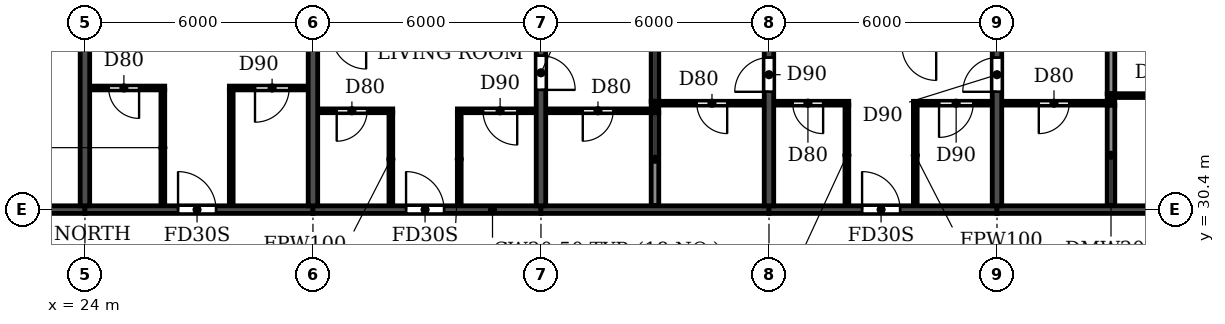
"""IFC4 building model, lengths in metres.
Left out: names, types, materials, properties, quantities, classifications, styles, units other than length and angle.
Written with IfcOpenShell. Run it as: python <this file> out.ifc"""

import sys

from ifc_helpers import new_model, si_unit, direction, frame, frame_2d, origin, place, context, subcontext, project, spatial, rectangle, extrude, element, fill, save


model = new_model("IFC4")
c1 = context("Model", 3, precision=1e-05, world=origin(), true_north=direction((0.0, 1.0)))
c2 = subcontext(c1, "Body", "Model", "MODEL_VIEW")
j1 = project(units=[si_unit("LENGTHUNIT", "METRE"), si_unit("PLANEANGLEUNIT", "RADIAN")], contexts=[c1])
p1 = place(None, origin())
s1 = spatial("IfcSite", under=j1, at=p1, CompositionType="ELEMENT")
p2 = place(p1, origin())
s2 = spatial("IfcBuilding", under=s1, at=p2, CompositionType="ELEMENT")
p3 = place(p2, frame((0.0, 0.0, 181.8)))
s3 = spatial("IfcBuildingStorey", under=s2, at=p3, CompositionType="ELEMENT", Elevation=181.8)
for number, where, z_axis, x_axis in (
    (1, (24.0, 30.5, 0.0), (0.0, 0.0, 1.0), (0.0, 1.0, 0.0)),
    (2, (30.0, 30.5, 0.0), (0.0, 0.0, 1.0), (0.0, 1.0, 0.0)),
):
    element("IfcWall", number, at=place(p3, frame(where, z_axis=z_axis, x_axis=x_axis)), inside=s3, PredefinedType="SHEAR", context=c2, shape_type="SweptSolid", body=[
        extrude(rectangle(XDim=10.5, YDim=0.25, at=frame_2d((5.25, 0.0))), origin(), (0.0, 0.0, 1.0), 3.08),
    ])
p4 = place(p3, frame((36.0, 30.5, 0.0), z_axis=(0.0, 0.0, 1.0), x_axis=(0.0, 1.0, 0.0)))
e3 = element("IfcWall", 3, at=p4, inside=s3, PredefinedType="SHEAR", context=c2, shape_type="SweptSolid", body=[
    extrude(rectangle(XDim=10.5, YDim=0.25, at=frame_2d((5.25, 0.0))), origin(), (0.0, 0.0, 1.0), 3.08),
])
p5 = place(p4, frame((3.05, 0.0, 0.0)))
e4 = element("IfcOpeningElement", 4, at=p5, cuts=e3, PredefinedType="OPENING", context=c2, shape_type="SweptSolid", body=[
    extrude(rectangle(XDim=0.9, YDim=2.1, at=frame_2d((0.45, 1.05))), frame((0.0, 0.135, 0.0), z_axis=(0.0, -1.0, 0.0), x_axis=(1.0, 0.0, 0.0)), (0.0, 0.0, 1.0), 0.27),
])
p6 = place(p3, frame((42.0, 30.5, 0.0), z_axis=(0.0, 0.0, 1.0), x_axis=(0.0, 1.0, 0.0)))
e5 = element("IfcWall", 5, at=p6, inside=s3, PredefinedType="SHEAR", context=c2, shape_type="SweptSolid", body=[
    extrude(rectangle(XDim=10.5, YDim=0.25, at=frame_2d((5.25, 0.0))), origin(), (0.0, 0.0, 1.0), 3.08),
])
p7 = place(p6, frame((3.0, 0.0, 0.0)))
e6 = element("IfcOpeningElement", 6, at=p7, cuts=e5, PredefinedType="OPENING", context=c2, shape_type="SweptSolid", body=[
    extrude(rectangle(XDim=0.9, YDim=2.1, at=frame_2d((0.45, 1.05))), frame((0.0, 0.135, 0.0), z_axis=(0.0, -1.0, 0.0), x_axis=(1.0, 0.0, 0.0)), (0.0, 0.0, 1.0), 0.27),
])
p8 = place(p3, frame((48.0, 30.5, 0.0), z_axis=(0.0, 0.0, 1.0), x_axis=(0.0, 1.0, 0.0)))
e7 = element("IfcWall", 7, at=p8, inside=s3, PredefinedType="SHEAR", context=c2, shape_type="SweptSolid", body=[
    extrude(rectangle(XDim=10.5, YDim=0.25, at=frame_2d((5.25, 0.0))), origin(), (0.0, 0.0, 1.0), 3.08),
])
p9 = place(p8, frame((3.0, 0.0, 0.0)))
e8 = element("IfcOpeningElement", 8, at=p9, cuts=e7, PredefinedType="OPENING", context=c2, shape_type="SweptSolid", body=[
    extrude(rectangle(XDim=0.9, YDim=2.1, at=frame_2d((0.45, 1.05))), frame((0.0, 0.135, 0.0), z_axis=(0.0, -1.0, 0.0), x_axis=(1.0, 0.0, 0.0)), (0.0, 0.0, 1.0), 0.27),
])
p10 = place(p3, frame((18.2, 30.4, 0.0), z_axis=(0.0, 0.0, 1.0), x_axis=(1.0, 0.0, 0.0)))
e9 = element("IfcWall", 9, at=p10, inside=s3, PredefinedType="SHEAR", context=c2, shape_type="SweptSolid", body=[
    extrude(rectangle(XDim=5.8, YDim=0.2, at=frame_2d((2.9, 0.0))), origin(), (0.0, 0.0, 1.0), 2.48),
])
p11 = place(p10, frame((2.3, 0.0, 0.0)))
e10 = element("IfcOpeningElement", 10, at=p11, cuts=e9, PredefinedType="OPENING", context=c2, shape_type="SweptSolid", body=[
    extrude(rectangle(XDim=1.0, YDim=2.1, at=frame_2d((0.5, 1.05))), frame((0.0, 0.11, 0.0), z_axis=(0.0, -1.0, 0.0), x_axis=(1.0, 0.0, 0.0)), (0.0, 0.0, 1.0), 0.22),
])
p12 = place(p3, frame((24.0, 30.4, 0.0), z_axis=(0.0, 0.0, 1.0), x_axis=(1.0, 0.0, 0.0)))
e11 = element("IfcWall", 11, at=p12, inside=s3, PredefinedType="SHEAR", context=c2, shape_type="SweptSolid", body=[
    extrude(rectangle(XDim=6.0, YDim=0.2, at=frame_2d((3.0, 0.0))), origin(), (0.0, 0.0, 1.0), 2.48),
])
p13 = place(p12, frame((2.45, 0.0, 0.0)))
e12 = element("IfcOpeningElement", 12, at=p13, cuts=e11, PredefinedType="OPENING", context=c2, shape_type="SweptSolid", body=[
    extrude(rectangle(XDim=1.0, YDim=2.1, at=frame_2d((0.5, 1.05))), frame((0.0, 0.11, 0.0), z_axis=(0.0, -1.0, 0.0), x_axis=(1.0, 0.0, 0.0)), (0.0, 0.0, 1.0), 0.22),
])
p14 = place(p3, frame((30.0, 30.4, 0.0), z_axis=(0.0, 0.0, 1.0), x_axis=(1.0, 0.0, 0.0)))
e13 = element("IfcWall", 13, at=p14, inside=s3, PredefinedType="SHEAR", context=c2, shape_type="SweptSolid", body=[
    extrude(rectangle(XDim=6.0, YDim=0.2, at=frame_2d((3.0, 0.0))), origin(), (0.0, 0.0, 1.0), 2.48),
])
p15 = place(p14, frame((2.45, 0.0, 0.0)))
e14 = element("IfcOpeningElement", 14, at=p15, cuts=e13, PredefinedType="OPENING", context=c2, shape_type="SweptSolid", body=[
    extrude(rectangle(XDim=1.0, YDim=2.1, at=frame_2d((0.5, 1.05))), frame((0.0, 0.11, 0.0), z_axis=(0.0, -1.0, 0.0), x_axis=(1.0, 0.0, 0.0)), (0.0, 0.0, 1.0), 0.22),
])
p16 = place(p3, frame((36.0, 30.4, 0.0), z_axis=(0.0, 0.0, 1.0), x_axis=(1.0, 0.0, 0.0)))
e15 = element("IfcWall", 15, at=p16, inside=s3, PredefinedType="SHEAR", context=c2, shape_type="SweptSolid", body=[
    extrude(rectangle(XDim=6.0, YDim=0.2, at=frame_2d((3.0, 0.0))), origin(), (0.0, 0.0, 1.0), 2.48),
])
p17 = place(p3, frame((42.0, 30.4, 0.0), z_axis=(0.0, 0.0, 1.0), x_axis=(1.0, 0.0, 0.0)))
e16 = element("IfcWall", 16, at=p17, inside=s3, PredefinedType="SHEAR", context=c2, shape_type="SweptSolid", body=[
    extrude(rectangle(XDim=6.0, YDim=0.2, at=frame_2d((3.0, 0.0))), origin(), (0.0, 0.0, 1.0), 2.48),
])
p18 = place(p17, frame((2.45, 0.0, 0.0)))
e17 = element("IfcOpeningElement", 17, at=p18, cuts=e16, PredefinedType="OPENING", context=c2, shape_type="SweptSolid", body=[
    extrude(rectangle(XDim=1.0, YDim=2.1, at=frame_2d((0.5, 1.05))), frame((0.0, 0.11, 0.0), z_axis=(0.0, -1.0, 0.0), x_axis=(1.0, 0.0, 0.0)), (0.0, 0.0, 1.0), 0.22),
])
p19 = place(p3, frame((48.0, 30.4, 0.0), z_axis=(0.0, 0.0, 1.0), x_axis=(1.0, 0.0, 0.0)))
e18 = element("IfcWall", 18, at=p19, inside=s3, PredefinedType="SHEAR", context=c2, shape_type="SweptSolid", body=[
    extrude(rectangle(XDim=6.0, YDim=0.2, at=frame_2d((3.0, 0.0))), origin(), (0.0, 0.0, 1.0), 2.48),
])
p20 = place(p3, frame((39.0, 30.51, 0.0), z_axis=(0.0, 0.0, 1.0), x_axis=(0.0, 1.0, 0.0)))
e19 = element("IfcWall", 19, at=p20, inside=s3, PredefinedType="PARTITIONING", context=c2, shape_type="SweptSolid", body=[
    extrude(rectangle(XDim=2.44, YDim=0.2, at=frame_2d((1.22, 0.0))), origin(), (0.0, 0.0, 1.0), 3.08),
])
p21 = place(p3, frame((39.0, 33.25, 0.0), z_axis=(0.0, 0.0, 1.0), x_axis=(0.0, 1.0, 0.0)))
e20 = element("IfcWall", 20, at=p21, inside=s3, PredefinedType="PARTITIONING", context=c2, shape_type="SweptSolid", body=[
    extrude(rectangle(XDim=7.89, YDim=0.2, at=frame_2d((3.945, 0.0))), origin(), (0.0, 0.0, 1.0), 3.08),
])
p22 = place(p3, frame((51.0, 30.51, 0.0), z_axis=(0.0, 0.0, 1.0), x_axis=(0.0, 1.0, 0.0)))
e21 = element("IfcWall", 21, at=p22, inside=s3, PredefinedType="PARTITIONING", context=c2, shape_type="SweptSolid", body=[
    extrude(rectangle(XDim=2.64, YDim=0.2, at=frame_2d((1.32, 0.0))), origin(), (0.0, 0.0, 1.0), 3.08),
])
p23 = place(p3, frame((51.0, 33.45, 0.0), z_axis=(0.0, 0.0, 1.0), x_axis=(0.0, 1.0, 0.0)))
e22 = element("IfcWall", 22, at=p23, inside=s3, PredefinedType="PARTITIONING", context=c2, shape_type="SweptSolid", body=[
    extrude(rectangle(XDim=7.69, YDim=0.2, at=frame_2d((3.845, 0.0))), origin(), (0.0, 0.0, 1.0), 3.08),
])
p24 = place(p3, frame((30.135, 33.0, 0.0), z_axis=(0.0, 0.0, 1.0), x_axis=(1.0, 0.0, 0.0)))
e23 = element("IfcWall", 23, at=p24, inside=s3, PredefinedType="PARTITIONING", context=c2, shape_type="SweptSolid", body=[
    extrude(rectangle(XDim=1.965, YDim=0.1, at=frame_2d((0.982, 0.0))), origin(), (0.0, 0.0, 1.0), 3.08),
])
p25 = place(p24, frame((0.49, 0.0, 0.0)))
e24 = element("IfcOpeningElement", 24, at=p25, cuts=e23, PredefinedType="OPENING", context=c2, shape_type="SweptSolid", body=[
    extrude(rectangle(XDim=0.8, YDim=2.1, at=frame_2d((0.4, 1.05))), frame((0.0, 0.06, 0.0), z_axis=(0.0, -1.0, 0.0), x_axis=(1.0, 0.0, 0.0)), (0.0, 0.0, 1.0), 0.12),
])
p26 = place(p3, frame((33.8, 33.0, 0.0), z_axis=(0.0, 0.0, 1.0), x_axis=(1.0, 0.0, 0.0)))
e25 = element("IfcWall", 25, at=p26, inside=s3, PredefinedType="PARTITIONING", context=c2, shape_type="SweptSolid", body=[
    extrude(rectangle(XDim=2.065, YDim=0.1, at=frame_2d((1.032, 0.0))), origin(), (0.0, 0.0, 1.0), 3.08),
])
p27 = place(p26, frame((0.675, 0.0, 0.0)))
e26 = element("IfcOpeningElement", 26, at=p27, cuts=e25, PredefinedType="OPENING", context=c2, shape_type="SweptSolid", body=[
    extrude(rectangle(XDim=0.9, YDim=2.1, at=frame_2d((0.45, 1.05))), frame((0.0, 0.06, 0.0), z_axis=(0.0, -1.0, 0.0), x_axis=(1.0, 0.0, 0.0)), (0.0, 0.0, 1.0), 0.12),
])
p28 = place(p3, frame((36.135, 33.0, 0.0), z_axis=(0.0, 0.0, 1.0), x_axis=(1.0, 0.0, 0.0)))
e27 = element("IfcWall", 27, at=p28, inside=s3, PredefinedType="PARTITIONING", context=c2, shape_type="SweptSolid", body=[
    extrude(rectangle(XDim=2.965, YDim=0.1, at=frame_2d((1.482, 0.0))), origin(), (0.0, 0.0, 1.0), 3.08),
])
p29 = place(p28, frame((0.965, 0.0, 0.0)))
e28 = element("IfcOpeningElement", 28, at=p29, cuts=e27, PredefinedType="OPENING", context=c2, shape_type="SweptSolid", body=[
    extrude(rectangle(XDim=0.8, YDim=2.1, at=frame_2d((0.4, 1.05))), frame((0.0, 0.06, 0.0), z_axis=(0.0, -1.0, 0.0), x_axis=(1.0, 0.0, 0.0)), (0.0, 0.0, 1.0), 0.12),
])
p30 = place(p3, frame((38.9, 33.2, 0.0), z_axis=(0.0, 0.0, 1.0), x_axis=(1.0, 0.0, 0.0)))
e29 = element("IfcWall", 29, at=p30, inside=s3, PredefinedType="PARTITIONING", context=c2, shape_type="SweptSolid", body=[
    extrude(rectangle(XDim=2.965, YDim=0.1, at=frame_2d((1.482, 0.0))), origin(), (0.0, 0.0, 1.0), 3.08),
])
p31 = place(p30, frame((1.2, 0.0, 0.0)))
e30 = element("IfcOpeningElement", 30, at=p31, cuts=e29, PredefinedType="OPENING", context=c2, shape_type="SweptSolid", body=[
    extrude(rectangle(XDim=0.8, YDim=2.1, at=frame_2d((0.4, 1.05))), frame((0.0, 0.06, 0.0), z_axis=(0.0, -1.0, 0.0), x_axis=(1.0, 0.0, 0.0)), (0.0, 0.0, 1.0), 0.12),
])
p32 = place(p3, frame((42.135, 33.2, 0.0), z_axis=(0.0, 0.0, 1.0), x_axis=(1.0, 0.0, 0.0)))
e31 = element("IfcWall", 31, at=p32, inside=s3, PredefinedType="PARTITIONING", context=c2, shape_type="SweptSolid", body=[
    extrude(rectangle(XDim=1.965, YDim=0.1, at=frame_2d((0.982, 0.0))), origin(), (0.0, 0.0, 1.0), 3.08),
])
p33 = place(p32, frame((0.49, 0.0, 0.0)))
e32 = element("IfcOpeningElement", 32, at=p33, cuts=e31, PredefinedType="OPENING", context=c2, shape_type="SweptSolid", body=[
    extrude(rectangle(XDim=0.8, YDim=2.1, at=frame_2d((0.4, 1.05))), frame((0.0, 0.06, 0.0), z_axis=(0.0, -1.0, 0.0), x_axis=(1.0, 0.0, 0.0)), (0.0, 0.0, 1.0), 0.12),
])
p34 = place(p3, frame((45.8, 33.2, 0.0), z_axis=(0.0, 0.0, 1.0), x_axis=(1.0, 0.0, 0.0)))
e33 = element("IfcWall", 33, at=p34, inside=s3, PredefinedType="PARTITIONING", context=c2, shape_type="SweptSolid", body=[
    extrude(rectangle(XDim=2.065, YDim=0.1, at=frame_2d((1.032, 0.0))), origin(), (0.0, 0.0, 1.0), 3.08),
])
p35 = place(p34, frame((0.675, 0.0, 0.0)))
e34 = element("IfcOpeningElement", 34, at=p35, cuts=e33, PredefinedType="OPENING", context=c2, shape_type="SweptSolid", body=[
    extrude(rectangle(XDim=0.9, YDim=2.1, at=frame_2d((0.45, 1.05))), frame((0.0, 0.06, 0.0), z_axis=(0.0, -1.0, 0.0), x_axis=(1.0, 0.0, 0.0)), (0.0, 0.0, 1.0), 0.12),
])
p36 = place(p3, frame((48.135, 33.2, 0.0), z_axis=(0.0, 0.0, 1.0), x_axis=(1.0, 0.0, 0.0)))
e35 = element("IfcWall", 35, at=p36, inside=s3, PredefinedType="PARTITIONING", context=c2, shape_type="SweptSolid", body=[
    extrude(rectangle(XDim=2.965, YDim=0.1, at=frame_2d((1.482, 0.0))), origin(), (0.0, 0.0, 1.0), 3.08),
])
p37 = place(p36, frame((0.965, 0.0, 0.0)))
e36 = element("IfcOpeningElement", 36, at=p37, cuts=e35, PredefinedType="OPENING", context=c2, shape_type="SweptSolid", body=[
    extrude(rectangle(XDim=0.8, YDim=2.1, at=frame_2d((0.4, 1.05))), frame((0.0, 0.06, 0.0), z_axis=(0.0, -1.0, 0.0), x_axis=(1.0, 0.0, 0.0)), (0.0, 0.0, 1.0), 0.12),
])
p38 = place(p3, frame((50.9, 33.4, 0.0), z_axis=(0.0, 0.0, 1.0), x_axis=(1.0, 0.0, 0.0)))
e37 = element("IfcWall", 37, at=p38, inside=s3, PredefinedType="PARTITIONING", context=c2, shape_type="SweptSolid", body=[
    extrude(rectangle(XDim=2.965, YDim=0.1, at=frame_2d((1.482, 0.0))), origin(), (0.0, 0.0, 1.0), 3.08),
])
p39 = place(p38, frame((1.2, 0.0, 0.0)))
e38 = element("IfcOpeningElement", 38, at=p39, cuts=e37, PredefinedType="OPENING", context=c2, shape_type="SweptSolid", body=[
    extrude(rectangle(XDim=0.8, YDim=2.1, at=frame_2d((0.4, 1.05))), frame((0.0, 0.06, 0.0), z_axis=(0.0, -1.0, 0.0), x_axis=(1.0, 0.0, 0.0)), (0.0, 0.0, 1.0), 0.12),
])
p40 = place(p3, frame((24.135, 33.6, 0.0), z_axis=(0.0, 0.0, 1.0), x_axis=(1.0, 0.0, 0.0)))
e39 = element("IfcWall", 39, at=p40, inside=s3, PredefinedType="PARTITIONING", context=c2, shape_type="SweptSolid", body=[
    extrude(rectangle(XDim=1.965, YDim=0.1, at=frame_2d((0.982, 0.0))), origin(), (0.0, 0.0, 1.0), 3.08),
])
p41 = place(p40, frame((0.49, 0.0, 0.0)))
e40 = element("IfcOpeningElement", 40, at=p41, cuts=e39, PredefinedType="OPENING", context=c2, shape_type="SweptSolid", body=[
    extrude(rectangle(XDim=0.8, YDim=2.1, at=frame_2d((0.4, 1.05))), frame((0.0, 0.06, 0.0), z_axis=(0.0, -1.0, 0.0), x_axis=(1.0, 0.0, 0.0)), (0.0, 0.0, 1.0), 0.12),
])
p42 = place(p3, frame((27.8, 33.6, 0.0), z_axis=(0.0, 0.0, 1.0), x_axis=(1.0, 0.0, 0.0)))
e41 = element("IfcWall", 41, at=p42, inside=s3, PredefinedType="PARTITIONING", context=c2, shape_type="SweptSolid", body=[
    extrude(rectangle(XDim=2.065, YDim=0.1, at=frame_2d((1.032, 0.0))), origin(), (0.0, 0.0, 1.0), 3.08),
])
p43 = place(p42, frame((0.675, 0.0, 0.0)))
e42 = element("IfcOpeningElement", 42, at=p43, cuts=e41, PredefinedType="OPENING", context=c2, shape_type="SweptSolid", body=[
    extrude(rectangle(XDim=0.9, YDim=2.1, at=frame_2d((0.45, 1.05))), frame((0.0, 0.06, 0.0), z_axis=(0.0, -1.0, 0.0), x_axis=(1.0, 0.0, 0.0)), (0.0, 0.0, 1.0), 0.12),
])
for number, where, z_axis, x_axis in (
    (43, (26.05, 30.51, 0.0), (0.0, 0.0, 1.0), (0.0, 1.0, 0.0)),
    (44, (27.85, 30.51, 0.0), (0.0, 0.0, 1.0), (0.0, 1.0, 0.0)),
):
    element("IfcWall", number, at=place(p3, frame(where, z_axis=z_axis, x_axis=x_axis)), inside=s3, PredefinedType="PARTITIONING", context=c2, shape_type="SweptSolid", body=[
        extrude(rectangle(XDim=3.04, YDim=0.1, at=frame_2d((1.52, 0.0))), origin(), (0.0, 0.0, 1.0), 3.08),
    ])
for number, where, z_axis, x_axis in (
    (45, (32.05, 30.51, 0.0), (0.0, 0.0, 1.0), (0.0, 1.0, 0.0)),
    (46, (33.85, 30.51, 0.0), (0.0, 0.0, 1.0), (0.0, 1.0, 0.0)),
):
    element("IfcWall", number, at=place(p3, frame(where, z_axis=z_axis, x_axis=x_axis)), inside=s3, PredefinedType="PARTITIONING", context=c2, shape_type="SweptSolid", body=[
        extrude(rectangle(XDim=2.44, YDim=0.1, at=frame_2d((1.22, 0.0))), origin(), (0.0, 0.0, 1.0), 3.08),
    ])
for number, where, z_axis, x_axis in (
    (47, (44.05, 30.51, 0.0), (0.0, 0.0, 1.0), (0.0, 1.0, 0.0)),
    (48, (45.85, 30.51, 0.0), (0.0, 0.0, 1.0), (0.0, 1.0, 0.0)),
):
    element("IfcWall", number, at=place(p3, frame(where, z_axis=z_axis, x_axis=x_axis)), inside=s3, PredefinedType="PARTITIONING", context=c2, shape_type="SweptSolid", body=[
        extrude(rectangle(XDim=2.64, YDim=0.1, at=frame_2d((1.32, 0.0))), origin(), (0.0, 0.0, 1.0), 3.08),
    ])
p44 = place(p41, frame((0.8, 0.0, 0.0), z_axis=(0.0, 0.0, 1.0), x_axis=(-1.0, 0.0, 0.0)))
e49 = element("IfcDoor", 49, at=p44, inside=s3, OperationType="SINGLE_SWING_LEFT", PredefinedType="DOOR", context=c2, shape_type="SweptSolid", body=[
    extrude(rectangle(XDim=0.8, YDim=2.1, at=frame_2d((0.4, 1.05))), frame((0.0, 0.025, 0.0), z_axis=(0.0, -1.0, 0.0), x_axis=(1.0, 0.0, 0.0)), (0.0, 0.0, 1.0), 0.05),
])
fill(e40, e49)
p45 = place(p13, origin())
e50 = element("IfcDoor", 50, at=p45, inside=s3, OperationType="SINGLE_SWING_LEFT", PredefinedType="DOOR", context=c2, shape_type="SweptSolid", body=[
    extrude(rectangle(XDim=1.0, YDim=2.1, at=frame_2d((0.5, 1.05))), frame((0.0, 0.025, 0.0), z_axis=(0.0, -1.0, 0.0), x_axis=(1.0, 0.0, 0.0)), (0.0, 0.0, 1.0), 0.05),
])
fill(e12, e50)
p46 = place(p43, frame((0.9, 0.0, 0.0), z_axis=(0.0, 0.0, 1.0), x_axis=(-1.0, 0.0, 0.0)))
e51 = element("IfcDoor", 51, at=p46, inside=s3, OperationType="SINGLE_SWING_RIGHT", PredefinedType="DOOR", context=c2, shape_type="SweptSolid", body=[
    extrude(rectangle(XDim=0.9, YDim=2.1, at=frame_2d((0.45, 1.05))), frame((0.0, 0.025, 0.0), z_axis=(0.0, -1.0, 0.0), x_axis=(1.0, 0.0, 0.0)), (0.0, 0.0, 1.0), 0.05),
])
fill(e42, e51)
p47 = place(p29, frame((0.8, 0.0, 0.0), z_axis=(0.0, 0.0, 1.0), x_axis=(-1.0, 0.0, 0.0)))
e52 = element("IfcDoor", 52, at=p47, inside=s3, OperationType="SINGLE_SWING_RIGHT", PredefinedType="DOOR", context=c2, shape_type="SweptSolid", body=[
    extrude(rectangle(XDim=0.8, YDim=2.1, at=frame_2d((0.4, 1.05))), frame((0.0, 0.025, 0.0), z_axis=(0.0, -1.0, 0.0), x_axis=(1.0, 0.0, 0.0)), (0.0, 0.0, 1.0), 0.05),
])
fill(e28, e52)
p48 = place(p25, frame((0.8, 0.0, 0.0), z_axis=(0.0, 0.0, 1.0), x_axis=(-1.0, 0.0, 0.0)))
e53 = element("IfcDoor", 53, at=p48, inside=s3, OperationType="SINGLE_SWING_RIGHT", PredefinedType="DOOR", context=c2, shape_type="SweptSolid", body=[
    extrude(rectangle(XDim=0.8, YDim=2.1, at=frame_2d((0.4, 1.05))), frame((0.0, 0.025, 0.0), z_axis=(0.0, -1.0, 0.0), x_axis=(1.0, 0.0, 0.0)), (0.0, 0.0, 1.0), 0.05),
])
fill(e24, e53)
p49 = place(p15, origin())
e54 = element("IfcDoor", 54, at=p49, inside=s3, OperationType="SINGLE_SWING_LEFT", PredefinedType="DOOR", context=c2, shape_type="SweptSolid", body=[
    extrude(rectangle(XDim=1.0, YDim=2.1, at=frame_2d((0.5, 1.05))), frame((0.0, 0.025, 0.0), z_axis=(0.0, -1.0, 0.0), x_axis=(1.0, 0.0, 0.0)), (0.0, 0.0, 1.0), 0.05),
])
fill(e14, e54)
p50 = place(p27, frame((0.9, 0.0, 0.0), z_axis=(0.0, 0.0, 1.0), x_axis=(-1.0, 0.0, 0.0)))
e55 = element("IfcDoor", 55, at=p50, inside=s3, OperationType="SINGLE_SWING_LEFT", PredefinedType="DOOR", context=c2, shape_type="SweptSolid", body=[
    extrude(rectangle(XDim=0.9, YDim=2.1, at=frame_2d((0.45, 1.05))), frame((0.0, 0.025, 0.0), z_axis=(0.0, -1.0, 0.0), x_axis=(1.0, 0.0, 0.0)), (0.0, 0.0, 1.0), 0.05),
])
fill(e26, e55)
p51 = place(p5, frame((0.9, 0.0, 0.0), z_axis=(0.0, 0.0, 1.0), x_axis=(-1.0, 0.0, 0.0)))
e56 = element("IfcDoor", 56, at=p51, inside=s3, OperationType="SINGLE_SWING_RIGHT", PredefinedType="DOOR", context=c2, shape_type="SweptSolid", body=[
    extrude(rectangle(XDim=0.9, YDim=2.1, at=frame_2d((0.45, 1.05))), frame((0.0, 0.025, 0.0), z_axis=(0.0, -1.0, 0.0), x_axis=(1.0, 0.0, 0.0)), (0.0, 0.0, 1.0), 0.05),
])
fill(e4, e56)
p52 = place(p31, frame((0.8, 0.0, 0.0), z_axis=(0.0, 0.0, 1.0), x_axis=(-1.0, 0.0, 0.0)))
e57 = element("IfcDoor", 57, at=p52, inside=s3, OperationType="SINGLE_SWING_LEFT", PredefinedType="DOOR", context=c2, shape_type="SweptSolid", body=[
    extrude(rectangle(XDim=0.8, YDim=2.1, at=frame_2d((0.4, 1.05))), frame((0.0, 0.025, 0.0), z_axis=(0.0, -1.0, 0.0), x_axis=(1.0, 0.0, 0.0)), (0.0, 0.0, 1.0), 0.05),
])
fill(e30, e57)
p53 = place(p37, frame((0.8, 0.0, 0.0), z_axis=(0.0, 0.0, 1.0), x_axis=(-1.0, 0.0, 0.0)))
e58 = element("IfcDoor", 58, at=p53, inside=s3, OperationType="SINGLE_SWING_RIGHT", PredefinedType="DOOR", context=c2, shape_type="SweptSolid", body=[
    extrude(rectangle(XDim=0.8, YDim=2.1, at=frame_2d((0.4, 1.05))), frame((0.0, 0.025, 0.0), z_axis=(0.0, -1.0, 0.0), x_axis=(1.0, 0.0, 0.0)), (0.0, 0.0, 1.0), 0.05),
])
fill(e36, e58)
p54 = place(p7, origin())
e59 = element("IfcDoor", 59, at=p54, inside=s3, OperationType="SINGLE_SWING_LEFT", PredefinedType="DOOR", context=c2, shape_type="SweptSolid", body=[
    extrude(rectangle(XDim=0.9, YDim=2.1, at=frame_2d((0.45, 1.05))), frame((0.0, 0.025, 0.0), z_axis=(0.0, -1.0, 0.0), x_axis=(1.0, 0.0, 0.0)), (0.0, 0.0, 1.0), 0.05),
])
fill(e6, e59)
p55 = place(p33, frame((0.8, 0.0, 0.0), z_axis=(0.0, 0.0, 1.0), x_axis=(-1.0, 0.0, 0.0)))
e60 = element("IfcDoor", 60, at=p55, inside=s3, OperationType="SINGLE_SWING_LEFT", PredefinedType="DOOR", context=c2, shape_type="SweptSolid", body=[
    extrude(rectangle(XDim=0.8, YDim=2.1, at=frame_2d((0.4, 1.05))), frame((0.0, 0.025, 0.0), z_axis=(0.0, -1.0, 0.0), x_axis=(1.0, 0.0, 0.0)), (0.0, 0.0, 1.0), 0.05),
])
fill(e32, e60)
p56 = place(p18, origin())
e61 = element("IfcDoor", 61, at=p56, inside=s3, OperationType="SINGLE_SWING_LEFT", PredefinedType="DOOR", context=c2, shape_type="SweptSolid", body=[
    extrude(rectangle(XDim=1.0, YDim=2.1, at=frame_2d((0.5, 1.05))), frame((0.0, 0.025, 0.0), z_axis=(0.0, -1.0, 0.0), x_axis=(1.0, 0.0, 0.0)), (0.0, 0.0, 1.0), 0.05),
])
fill(e17, e61)
p57 = place(p35, frame((0.9, 0.0, 0.0), z_axis=(0.0, 0.0, 1.0), x_axis=(-1.0, 0.0, 0.0)))
e62 = element("IfcDoor", 62, at=p57, inside=s3, OperationType="SINGLE_SWING_RIGHT", PredefinedType="DOOR", context=c2, shape_type="SweptSolid", body=[
    extrude(rectangle(XDim=0.9, YDim=2.1, at=frame_2d((0.45, 1.05))), frame((0.0, 0.025, 0.0), z_axis=(0.0, -1.0, 0.0), x_axis=(1.0, 0.0, 0.0)), (0.0, 0.0, 1.0), 0.05),
])
fill(e34, e62)
p58 = place(p9, origin())
e63 = element("IfcDoor", 63, at=p58, inside=s3, OperationType="SINGLE_SWING_LEFT", PredefinedType="DOOR", context=c2, shape_type="SweptSolid", body=[
    extrude(rectangle(XDim=0.9, YDim=2.1, at=frame_2d((0.45, 1.05))), frame((0.0, 0.025, 0.0), z_axis=(0.0, -1.0, 0.0), x_axis=(1.0, 0.0, 0.0)), (0.0, 0.0, 1.0), 0.05),
])
fill(e8, e63)
save(model, sys.argv[1])
